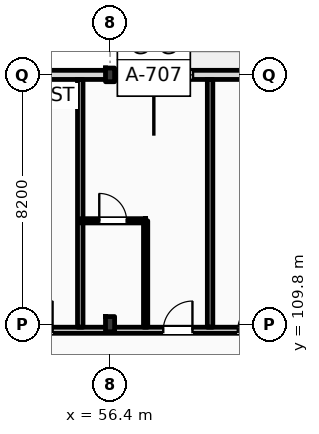
"""IFC4 building model, lengths in metres.
Left out: names, types, materials, properties, quantities, classifications, styles, units other than length and angle.
Written with IfcOpenShell. Run it as: python <this file> out.ifc"""

import sys

from ifc_helpers import new_model, si_unit, direction, frame, frame_2d, origin, origin_2d, place, context, subcontext, project, spatial, rectangle, i_section, extrude, element, fill, save


model = new_model("IFC4")
c1 = context("Model", 3, precision=1e-05, world=origin(), true_north=direction((0.0, 1.0)))
c2 = subcontext(c1, "Body", "Model", "MODEL_VIEW")
j1 = project(units=[si_unit("LENGTHUNIT", "METRE"), si_unit("PLANEANGLEUNIT", "RADIAN")], contexts=[c1])
p1 = place(None, origin())
s1 = spatial("IfcSite", under=j1, at=p1, CompositionType="ELEMENT")
p2 = place(p1, origin())
s2 = spatial("IfcBuilding", under=s1, at=p2, CompositionType="ELEMENT")
p3 = place(p2, frame((0.0, 0.0, 31.8)))
s3 = spatial("IfcBuildingStorey", under=s2, at=p3, CompositionType="ELEMENT", Elevation=31.8)
p4 = place(p3, frame((56.4, 109.8, 0.0), z_axis=(0.0, 0.0, 1.0), x_axis=(1.0, 0.0, 0.0)))
e1 = element("IfcColumn", 1, at=p4, inside=s3, PredefinedType="COLUMN", context=c2, shape_type="SweptSolid", body=[
    extrude(i_section(OverallWidth=0.3, OverallDepth=0.5, WebThickness=0.014, FlangeThickness=0.028, FilletRadius=0.027, at=origin_2d()), origin(), (0.0, 0.0, 1.0), 3.6),
])
p5 = place(p3, frame((56.4, 118.0, 0.0), z_axis=(0.0, 0.0, 1.0), x_axis=(1.0, 0.0, 0.0)))
e2 = element("IfcColumn", 2, at=p5, inside=s3, PredefinedType="COLUMN", context=c2, shape_type="SweptSolid", body=[
    extrude(i_section(OverallWidth=0.3, OverallDepth=0.45, WebThickness=0.014, FlangeThickness=0.026, FilletRadius=0.027, at=origin_2d()), origin(), (0.0, 0.0, 1.0), 3.6),
])
p6 = place(p3, frame((22.5, 118.0, 0.0), z_axis=(0.0, 0.0, 1.0), x_axis=(1.0, 0.0, 0.0)))
e3 = element("IfcWall", 3, at=p6, inside=s3, PredefinedType="STANDARD", context=c2, shape_type="SweptSolid", body=[
    extrude(rectangle(XDim=97.5, YDim=0.3, at=frame_2d((48.75, 0.0))), origin(), (0.0, 0.0, 1.0), 2.72),
])
p7 = place(p6, frame((3.61, 0.0, 0.9)))
e4 = element("IfcOpeningElement", 4, at=p7, cuts=e3, PredefinedType="OPENING", context=c2, shape_type="SweptSolid", body=[
    extrude(rectangle(XDim=1.1, YDim=1.64, at=frame_2d((0.55, 0.82))), frame((0.0, 0.16, 0.0), z_axis=(0.0, -1.0, 0.0), x_axis=(1.0, 0.0, 0.0)), (0.0, 0.0, 1.0), 0.32),
])
p8 = place(p6, frame((6.855, 0.0, 0.0)))
e5 = element("IfcOpeningElement", 5, at=p8, cuts=e3, PredefinedType="OPENING", context=c2, shape_type="SweptSolid", body=[
    extrude(rectangle(XDim=1.2, YDim=2.25, at=frame_2d((0.6, 1.125))), frame((0.0, 0.16, 0.0), z_axis=(0.0, -1.0, 0.0), x_axis=(1.0, 0.0, 0.0)), (0.0, 0.0, 1.0), 0.32),
])
p9 = place(p6, frame((11.405, 0.0, 0.9)))
e6 = element("IfcOpeningElement", 6, at=p9, cuts=e3, PredefinedType="OPENING", context=c2, shape_type="SweptSolid", body=[
    extrude(rectangle(XDim=2.1, YDim=1.64, at=frame_2d((1.05, 0.82))), frame((0.0, 0.16, 0.0), z_axis=(0.0, -1.0, 0.0), x_axis=(1.0, 0.0, 0.0)), (0.0, 0.0, 1.0), 0.32),
])
p10 = place(p6, frame((15.13, 0.0, 0.9)))
e7 = element("IfcOpeningElement", 7, at=p10, cuts=e3, PredefinedType="OPENING", context=c2, shape_type="SweptSolid", body=[
    extrude(rectangle(XDim=2.25, YDim=1.64, at=frame_2d((1.125, 0.82))), frame((0.0, 0.16, 0.0), z_axis=(0.0, -1.0, 0.0), x_axis=(1.0, 0.0, 0.0)), (0.0, 0.0, 1.0), 0.32),
])
p11 = place(p6, frame((21.53, 0.0, 0.0)))
e8 = element("IfcOpeningElement", 8, at=p11, cuts=e3, PredefinedType="OPENING", context=c2, shape_type="SweptSolid", body=[
    extrude(rectangle(XDim=1.2, YDim=2.25, at=frame_2d((0.6, 1.125))), frame((0.0, 0.16, 0.0), z_axis=(0.0, -1.0, 0.0), x_axis=(1.0, 0.0, 0.0)), (0.0, 0.0, 1.0), 0.32),
])
p12 = place(p6, frame((24.18, 0.0, 0.9)))
e9 = element("IfcOpeningElement", 9, at=p12, cuts=e3, PredefinedType="OPENING", context=c2, shape_type="SweptSolid", body=[
    extrude(rectangle(XDim=1.1, YDim=1.64, at=frame_2d((0.55, 0.82))), frame((0.0, 0.16, 0.0), z_axis=(0.0, -1.0, 0.0), x_axis=(1.0, 0.0, 0.0)), (0.0, 0.0, 1.0), 0.32),
])
p13 = place(p6, frame((29.105, 0.0, 0.9)))
e10 = element("IfcOpeningElement", 10, at=p13, cuts=e3, PredefinedType="OPENING", context=c2, shape_type="SweptSolid", body=[
    extrude(rectangle(XDim=2.7, YDim=1.64, at=frame_2d((1.35, 0.82))), frame((0.0, 0.16, 0.0), z_axis=(0.0, -1.0, 0.0), x_axis=(1.0, 0.0, 0.0)), (0.0, 0.0, 1.0), 0.32),
])
p14 = place(p6, frame((34.83, 0.0, 0.9)))
e11 = element("IfcOpeningElement", 11, at=p14, cuts=e3, PredefinedType="OPENING", context=c2, shape_type="SweptSolid", body=[
    extrude(rectangle(XDim=1.8, YDim=1.64, at=frame_2d((0.9, 0.82))), frame((0.0, 0.16, 0.0), z_axis=(0.0, -1.0, 0.0), x_axis=(1.0, 0.0, 0.0)), (0.0, 0.0, 1.0), 0.32),
])
p15 = place(p6, frame((38.525, 0.0, 0.0)))
e12 = element("IfcOpeningElement", 12, at=p15, cuts=e3, PredefinedType="OPENING", context=c2, shape_type="SweptSolid", body=[
    extrude(rectangle(XDim=1.2, YDim=2.25, at=frame_2d((0.6, 1.125))), frame((0.0, 0.16, 0.0), z_axis=(0.0, -1.0, 0.0), x_axis=(1.0, 0.0, 0.0)), (0.0, 0.0, 1.0), 0.32),
])
p16 = place(p6, frame((42.73, 0.0, 0.9)))
e13 = element("IfcOpeningElement", 13, at=p16, cuts=e3, PredefinedType="OPENING", context=c2, shape_type="SweptSolid", body=[
    extrude(rectangle(XDim=3.05, YDim=1.64, at=frame_2d((1.525, 0.82))), frame((0.0, 0.16, 0.0), z_axis=(0.0, -1.0, 0.0), x_axis=(1.0, 0.0, 0.0)), (0.0, 0.0, 1.0), 0.32),
])
p17 = place(p6, frame((47.155, 0.0, 0.9)))
e14 = element("IfcOpeningElement", 14, at=p17, cuts=e3, PredefinedType="OPENING", context=c2, shape_type="SweptSolid", body=[
    extrude(rectangle(XDim=1.35, YDim=1.64, at=frame_2d((0.675, 0.82))), frame((0.0, 0.16, 0.0), z_axis=(0.0, -1.0, 0.0), x_axis=(1.0, 0.0, 0.0)), (0.0, 0.0, 1.0), 0.32),
])
p18 = place(p6, frame((53.065, 0.0, 0.0)))
e15 = element("IfcOpeningElement", 15, at=p18, cuts=e3, PredefinedType="OPENING", context=c2, shape_type="SweptSolid", body=[
    extrude(rectangle(XDim=1.2, YDim=2.25, at=frame_2d((0.6, 1.125))), frame((0.0, 0.16, 0.0), z_axis=(0.0, -1.0, 0.0), x_axis=(1.0, 0.0, 0.0)), (0.0, 0.0, 1.0), 0.32),
])
p19 = place(p6, frame((58.2, 0.0, 0.9)))
e16 = element("IfcOpeningElement", 16, at=p19, cuts=e3, PredefinedType="OPENING", context=c2, shape_type="SweptSolid", body=[
    extrude(rectangle(XDim=1.8, YDim=1.64, at=frame_2d((0.9, 0.82))), frame((0.0, 0.16, 0.0), z_axis=(0.0, -1.0, 0.0), x_axis=(1.0, 0.0, 0.0)), (0.0, 0.0, 1.0), 0.32),
])
p20 = place(p6, frame((61.13, 0.0, 0.9)))
e17 = element("IfcOpeningElement", 17, at=p20, cuts=e3, PredefinedType="OPENING", context=c2, shape_type="SweptSolid", body=[
    extrude(rectangle(XDim=3.05, YDim=1.64, at=frame_2d((1.525, 0.82))), frame((0.0, 0.16, 0.0), z_axis=(0.0, -1.0, 0.0), x_axis=(1.0, 0.0, 0.0)), (0.0, 0.0, 1.0), 0.32),
])
p21 = place(p6, frame((67.93, 0.0, 0.0)))
e18 = element("IfcOpeningElement", 18, at=p21, cuts=e3, PredefinedType="OPENING", context=c2, shape_type="SweptSolid", body=[
    extrude(rectangle(XDim=1.2, YDim=2.25, at=frame_2d((0.6, 1.125))), frame((0.0, 0.16, 0.0), z_axis=(0.0, -1.0, 0.0), x_axis=(1.0, 0.0, 0.0)), (0.0, 0.0, 1.0), 0.32),
])
p22 = place(p6, frame((70.39, 0.0, 0.0)))
e19 = element("IfcOpeningElement", 19, at=p22, cuts=e3, PredefinedType="OPENING", context=c2, shape_type="SweptSolid", body=[
    extrude(rectangle(XDim=1.2, YDim=2.25, at=frame_2d((0.6, 1.125))), frame((0.0, 0.16, 0.0), z_axis=(0.0, -1.0, 0.0), x_axis=(1.0, 0.0, 0.0)), (0.0, 0.0, 1.0), 0.32),
])
p23 = place(p6, frame((75.905, 0.0, 0.9)))
e20 = element("IfcOpeningElement", 20, at=p23, cuts=e3, PredefinedType="OPENING", context=c2, shape_type="SweptSolid", body=[
    extrude(rectangle(XDim=1.1, YDim=1.5, at=frame_2d((0.55, 0.75))), frame((0.0, 0.16, 0.0), z_axis=(0.0, -1.0, 0.0), x_axis=(1.0, 0.0, 0.0)), (0.0, 0.0, 1.0), 0.32),
])
p24 = place(p6, frame((81.63, 0.0, 0.9)))
e21 = element("IfcOpeningElement", 21, at=p24, cuts=e3, PredefinedType="OPENING", context=c2, shape_type="SweptSolid", body=[
    extrude(rectangle(XDim=1.1, YDim=1.6, at=frame_2d((0.55, 0.8))), frame((0.0, 0.16, 0.0), z_axis=(0.0, -1.0, 0.0), x_axis=(1.0, 0.0, 0.0)), (0.0, 0.0, 1.0), 0.32),
])
p25 = place(p6, frame((84.955, 0.0, 0.9)))
e22 = element("IfcOpeningElement", 22, at=p25, cuts=e3, PredefinedType="OPENING", context=c2, shape_type="SweptSolid", body=[
    extrude(rectangle(XDim=1.4, YDim=1.64, at=frame_2d((0.7, 0.82))), frame((0.0, 0.16, 0.0), z_axis=(0.0, -1.0, 0.0), x_axis=(1.0, 0.0, 0.0)), (0.0, 0.0, 1.0), 0.32),
])
p26 = place(p6, frame((90.055, 0.0, 0.9)))
e23 = element("IfcOpeningElement", 23, at=p26, cuts=e3, PredefinedType="OPENING", context=c2, shape_type="SweptSolid", body=[
    extrude(rectangle(XDim=1.6, YDim=1.64, at=frame_2d((0.8, 0.82))), frame((0.0, 0.16, 0.0), z_axis=(0.0, -1.0, 0.0), x_axis=(1.0, 0.0, 0.0)), (0.0, 0.0, 1.0), 0.32),
])
p27 = place(p6, frame((93.87, 0.0, 0.9)))
e24 = element("IfcOpeningElement", 24, at=p27, cuts=e3, PredefinedType="OPENING", context=c2, shape_type="SweptSolid", body=[
    extrude(rectangle(XDim=1.75, YDim=1.64, at=frame_2d((0.875, 0.82))), frame((0.0, 0.16, 0.0), z_axis=(0.0, -1.0, 0.0), x_axis=(1.0, 0.0, 0.0)), (0.0, 0.0, 1.0), 0.32),
])
p28 = place(p3, frame((10.65, 109.6, 0.0), z_axis=(0.0, 0.0, 1.0), x_axis=(1.0, 0.0, 0.0)))
e25 = element("IfcWall", 25, at=p28, inside=s3, PredefinedType="PARTITIONING", context=c2, shape_type="SweptSolid", body=[
    extrude(rectangle(XDim=109.21, YDim=0.2, at=frame_2d((54.605, 0.0))), origin(), (0.0, 0.0, 1.0), 2.72),
])
p29 = place(p28, frame((15.825, 0.0, 0.0)))
e26 = element("IfcOpeningElement", 26, at=p29, cuts=e25, PredefinedType="OPENING", context=c2, shape_type="SweptSolid", body=[
    extrude(rectangle(XDim=1.02, YDim=2.2, at=frame_2d((0.51, 1.1))), frame((0.0, 0.11, 0.0), z_axis=(0.0, -1.0, 0.0), x_axis=(1.0, 0.0, 0.0)), (0.0, 0.0, 1.0), 0.22),
])
p30 = place(p28, frame((19.87, 0.0, 0.0)))
e27 = element("IfcOpeningElement", 27, at=p30, cuts=e25, PredefinedType="OPENING", context=c2, shape_type="SweptSolid", body=[
    extrude(rectangle(XDim=1.02, YDim=2.2, at=frame_2d((0.51, 1.1))), frame((0.0, 0.11, 0.0), z_axis=(0.0, -1.0, 0.0), x_axis=(1.0, 0.0, 0.0)), (0.0, 0.0, 1.0), 0.22),
])
p31 = place(p28, frame((24.47, 0.0, 0.0)))
e28 = element("IfcOpeningElement", 28, at=p31, cuts=e25, PredefinedType="OPENING", context=c2, shape_type="SweptSolid", body=[
    extrude(rectangle(XDim=1.02, YDim=2.2, at=frame_2d((0.51, 1.1))), frame((0.0, 0.11, 0.0), z_axis=(0.0, -1.0, 0.0), x_axis=(1.0, 0.0, 0.0)), (0.0, 0.0, 1.0), 0.22),
])
p32 = place(p28, frame((26.92, 0.0, 0.0)))
e29 = element("IfcOpeningElement", 29, at=p32, cuts=e25, PredefinedType="OPENING", context=c2, shape_type="SweptSolid", body=[
    extrude(rectangle(XDim=1.02, YDim=2.2, at=frame_2d((0.51, 1.1))), frame((0.0, 0.11, 0.0), z_axis=(0.0, -1.0, 0.0), x_axis=(1.0, 0.0, 0.0)), (0.0, 0.0, 1.0), 0.22),
])
p33 = place(p28, frame((33.7, 0.0, 0.0)))
e30 = element("IfcOpeningElement", 30, at=p33, cuts=e25, PredefinedType="OPENING", context=c2, shape_type="SweptSolid", body=[
    extrude(rectangle(XDim=0.96, YDim=2.2, at=frame_2d((0.48, 1.1))), frame((0.0, 0.11, 0.0), z_axis=(0.0, -1.0, 0.0), x_axis=(1.0, 0.0, 0.0)), (0.0, 0.0, 1.0), 0.22),
])
p34 = place(p28, frame((35.9, 0.0, 0.0)))
e31 = element("IfcOpeningElement", 31, at=p34, cuts=e25, PredefinedType="OPENING", context=c2, shape_type="SweptSolid", body=[
    extrude(rectangle(XDim=0.96, YDim=2.2, at=frame_2d((0.48, 1.1))), frame((0.0, 0.11, 0.0), z_axis=(0.0, -1.0, 0.0), x_axis=(1.0, 0.0, 0.0)), (0.0, 0.0, 1.0), 0.22),
])
p35 = place(p28, frame((42.9, 0.0, 0.0)))
e32 = element("IfcOpeningElement", 32, at=p35, cuts=e25, PredefinedType="OPENING", context=c2, shape_type="SweptSolid", body=[
    extrude(rectangle(XDim=0.96, YDim=2.2, at=frame_2d((0.48, 1.1))), frame((0.0, 0.11, 0.0), z_axis=(0.0, -1.0, 0.0), x_axis=(1.0, 0.0, 0.0)), (0.0, 0.0, 1.0), 0.22),
])
p36 = place(p28, frame((47.5, 0.0, 0.0)))
e33 = element("IfcOpeningElement", 33, at=p36, cuts=e25, PredefinedType="OPENING", context=c2, shape_type="SweptSolid", body=[
    extrude(rectangle(XDim=0.96, YDim=2.2, at=frame_2d((0.48, 1.1))), frame((0.0, 0.11, 0.0), z_axis=(0.0, -1.0, 0.0), x_axis=(1.0, 0.0, 0.0)), (0.0, 0.0, 1.0), 0.22),
])
p37 = place(p28, frame((49.95, 0.0, 0.0)))
e34 = element("IfcOpeningElement", 34, at=p37, cuts=e25, PredefinedType="OPENING", context=c2, shape_type="SweptSolid", body=[
    extrude(rectangle(XDim=0.96, YDim=2.2, at=frame_2d((0.48, 1.1))), frame((0.0, 0.11, 0.0), z_axis=(0.0, -1.0, 0.0), x_axis=(1.0, 0.0, 0.0)), (0.0, 0.0, 1.0), 0.22),
])
p38 = place(p28, frame((56.7, 0.0, 0.0)))
e35 = element("IfcOpeningElement", 35, at=p38, cuts=e25, PredefinedType="OPENING", context=c2, shape_type="SweptSolid", body=[
    extrude(rectangle(XDim=0.96, YDim=2.2, at=frame_2d((0.48, 1.1))), frame((0.0, 0.11, 0.0), z_axis=(0.0, -1.0, 0.0), x_axis=(1.0, 0.0, 0.0)), (0.0, 0.0, 1.0), 0.22),
])
p39 = place(p28, frame((59.15, 0.0, 0.0)))
e36 = element("IfcOpeningElement", 36, at=p39, cuts=e25, PredefinedType="OPENING", context=c2, shape_type="SweptSolid", body=[
    extrude(rectangle(XDim=0.96, YDim=2.2, at=frame_2d((0.48, 1.1))), frame((0.0, 0.11, 0.0), z_axis=(0.0, -1.0, 0.0), x_axis=(1.0, 0.0, 0.0)), (0.0, 0.0, 1.0), 0.22),
])
p40 = place(p28, frame((65.9, 0.0, 0.0)))
e37 = element("IfcOpeningElement", 37, at=p40, cuts=e25, PredefinedType="OPENING", context=c2, shape_type="SweptSolid", body=[
    extrude(rectangle(XDim=0.96, YDim=2.2, at=frame_2d((0.48, 1.1))), frame((0.0, 0.11, 0.0), z_axis=(0.0, -1.0, 0.0), x_axis=(1.0, 0.0, 0.0)), (0.0, 0.0, 1.0), 0.22),
])
p41 = place(p28, frame((70.5, 0.0, 0.0)))
e38 = element("IfcOpeningElement", 38, at=p41, cuts=e25, PredefinedType="OPENING", context=c2, shape_type="SweptSolid", body=[
    extrude(rectangle(XDim=0.96, YDim=2.2, at=frame_2d((0.48, 1.1))), frame((0.0, 0.11, 0.0), z_axis=(0.0, -1.0, 0.0), x_axis=(1.0, 0.0, 0.0)), (0.0, 0.0, 1.0), 0.22),
])
p42 = place(p28, frame((72.95, 0.0, 0.0)))
e39 = element("IfcOpeningElement", 39, at=p42, cuts=e25, PredefinedType="OPENING", context=c2, shape_type="SweptSolid", body=[
    extrude(rectangle(XDim=0.96, YDim=2.2, at=frame_2d((0.48, 1.1))), frame((0.0, 0.11, 0.0), z_axis=(0.0, -1.0, 0.0), x_axis=(1.0, 0.0, 0.0)), (0.0, 0.0, 1.0), 0.22),
])
p43 = place(p28, frame((79.7, 0.0, 0.0)))
e40 = element("IfcOpeningElement", 40, at=p43, cuts=e25, PredefinedType="OPENING", context=c2, shape_type="SweptSolid", body=[
    extrude(rectangle(XDim=0.96, YDim=2.2, at=frame_2d((0.48, 1.1))), frame((0.0, 0.11, 0.0), z_axis=(0.0, -1.0, 0.0), x_axis=(1.0, 0.0, 0.0)), (0.0, 0.0, 1.0), 0.22),
])
p44 = place(p28, frame((82.15, 0.0, 0.0)))
e41 = element("IfcOpeningElement", 41, at=p44, cuts=e25, PredefinedType="OPENING", context=c2, shape_type="SweptSolid", body=[
    extrude(rectangle(XDim=0.96, YDim=2.2, at=frame_2d((0.48, 1.1))), frame((0.0, 0.11, 0.0), z_axis=(0.0, -1.0, 0.0), x_axis=(1.0, 0.0, 0.0)), (0.0, 0.0, 1.0), 0.22),
])
p45 = place(p28, frame((88.9, 0.0, 0.0)))
e42 = element("IfcOpeningElement", 42, at=p45, cuts=e25, PredefinedType="OPENING", context=c2, shape_type="SweptSolid", body=[
    extrude(rectangle(XDim=0.96, YDim=2.2, at=frame_2d((0.48, 1.1))), frame((0.0, 0.11, 0.0), z_axis=(0.0, -1.0, 0.0), x_axis=(1.0, 0.0, 0.0)), (0.0, 0.0, 1.0), 0.22),
])
p46 = place(p28, frame((93.75, 0.0, 0.0)))
e43 = element("IfcOpeningElement", 43, at=p46, cuts=e25, PredefinedType="OPENING", context=c2, shape_type="SweptSolid", body=[
    extrude(rectangle(XDim=0.96, YDim=2.2, at=frame_2d((0.48, 1.1))), frame((0.0, 0.11, 0.0), z_axis=(0.0, -1.0, 0.0), x_axis=(1.0, 0.0, 0.0)), (0.0, 0.0, 1.0), 0.22),
])
p47 = place(p28, frame((98.1, 0.0, 0.0)))
e44 = element("IfcOpeningElement", 44, at=p47, cuts=e25, PredefinedType="OPENING", context=c2, shape_type="SweptSolid", body=[
    extrude(rectangle(XDim=0.96, YDim=2.2, at=frame_2d((0.48, 1.1))), frame((0.0, 0.11, 0.0), z_axis=(0.0, -1.0, 0.0), x_axis=(1.0, 0.0, 0.0)), (0.0, 0.0, 1.0), 0.22),
])
p48 = place(p28, frame((102.7, 0.0, 0.0)))
e45 = element("IfcOpeningElement", 45, at=p48, cuts=e25, PredefinedType="OPENING", context=c2, shape_type="SweptSolid", body=[
    extrude(rectangle(XDim=0.96, YDim=2.2, at=frame_2d((0.48, 1.1))), frame((0.0, 0.11, 0.0), z_axis=(0.0, -1.0, 0.0), x_axis=(1.0, 0.0, 0.0)), (0.0, 0.0, 1.0), 0.22),
])
p49 = place(p28, frame((105.04, 0.0, 0.0)))
e46 = element("IfcOpeningElement", 46, at=p49, cuts=e25, PredefinedType="OPENING", context=c2, shape_type="SweptSolid", body=[
    extrude(rectangle(XDim=0.96, YDim=2.2, at=frame_2d((0.48, 1.1))), frame((0.0, 0.11, 0.0), z_axis=(0.0, -1.0, 0.0), x_axis=(1.0, 0.0, 0.0)), (0.0, 0.0, 1.0), 0.22),
])
p50 = place(p28, frame((2.716, 0.0, 0.0)))
e47 = element("IfcOpeningElement", 47, at=p50, cuts=e25, PredefinedType="OPENING", context=c2, shape_type="SweptSolid", body=[
    extrude(rectangle(XDim=1.35, YDim=2.25, at=frame_2d((0.675, 1.125))), frame((0.0, 0.11, 0.0), z_axis=(0.0, -1.0, 0.0), x_axis=(1.0, 0.0, 0.0)), (0.0, 0.0, 1.0), 0.22),
])
p51 = place(p28, frame((6.65, 0.0, 0.0)))
e48 = element("IfcOpeningElement", 48, at=p51, cuts=e25, PredefinedType="OPENING", context=c2, shape_type="SweptSolid", body=[
    extrude(rectangle(XDim=1.35, YDim=2.25, at=frame_2d((0.675, 1.125))), frame((0.0, 0.11, 0.0), z_axis=(0.0, -1.0, 0.0), x_axis=(1.0, 0.0, 0.0)), (0.0, 0.0, 1.0), 0.22),
])
p52 = place(p28, frame((10.583, 0.0, 0.0)))
e49 = element("IfcOpeningElement", 49, at=p52, cuts=e25, PredefinedType="OPENING", context=c2, shape_type="SweptSolid", body=[
    extrude(rectangle(XDim=1.35, YDim=2.25, at=frame_2d((0.675, 1.125))), frame((0.0, 0.11, 0.0), z_axis=(0.0, -1.0, 0.0), x_axis=(1.0, 0.0, 0.0)), (0.0, 0.0, 1.0), 0.22),
])
for number, where, z_axis, x_axis in (
    (50, (55.42, 109.7, 0.0), (0.0, 0.0, 1.0), (0.0, 1.0, 0.0)),
    (51, (59.69, 109.7, 0.0), (0.0, 0.0, 1.0), (0.0, 1.0, 0.0)),
):
    element("IfcWall", number, at=place(p3, frame(where, z_axis=z_axis, x_axis=x_axis)), inside=s3, PredefinedType="PARTITIONING", context=c2, shape_type="SweptSolid", body=[
        extrude(rectangle(XDim=8.15, YDim=0.18, at=frame_2d((4.075, 0.0))), origin(), (0.0, 0.0, 1.0), 3.36),
    ])
p53 = place(p3, frame((57.57, 109.7, 0.0), z_axis=(0.0, 0.0, 1.0), x_axis=(0.0, 1.0, 0.0)))
e52 = element("IfcWall", 52, at=p53, inside=s3, PredefinedType="PARTITIONING", context=c2, shape_type="SweptSolid", body=[
    extrude(rectangle(XDim=3.5, YDim=0.14, at=frame_2d((1.75, 0.0))), origin(), (0.0, 0.0, 1.0), 3.36),
])
p54 = place(p3, frame((55.42, 113.2, 0.0), z_axis=(0.0, 0.0, 1.0), x_axis=(1.0, 0.0, 0.0)))
e53 = element("IfcWall", 53, at=p54, inside=s3, PredefinedType="PARTITIONING", context=c2, shape_type="SweptSolid", body=[
    extrude(rectangle(XDim=2.15, YDim=0.14, at=frame_2d((1.075, 0.0))), origin(), (0.0, 0.0, 1.0), 3.36),
])
p55 = place(p54, frame((0.625, 0.0, 0.0)))
e54 = element("IfcOpeningElement", 54, at=p55, cuts=e53, PredefinedType="OPENING", context=c2, shape_type="SweptSolid", body=[
    extrude(rectangle(XDim=0.9, YDim=2.1, at=frame_2d((0.45, 1.05))), frame((0.0, 0.08, 0.0), z_axis=(0.0, -1.0, 0.0), x_axis=(1.0, 0.0, 0.0)), (0.0, 0.0, 1.0), 0.16),
])
p56 = place(p14, origin())
e55 = element("IfcWindow", 55, at=p56, inside=s3, PartitioningType="DOUBLE_PANEL_VERTICAL", PredefinedType="WINDOW", context=c2, shape_type="SweptSolid", body=[
    extrude(rectangle(XDim=1.8, YDim=1.64, at=frame_2d((0.9, 0.82))), frame((0.0, 0.03, 0.0), z_axis=(0.0, -1.0, 0.0), x_axis=(1.0, 0.0, 0.0)), (0.0, 0.0, 1.0), 0.06),
])
fill(e11, e55)
p57 = place(p35, origin())
e56 = element("IfcDoor", 56, at=p57, inside=s3, OperationType="SINGLE_SWING_RIGHT", PredefinedType="DOOR", context=c2, shape_type="SweptSolid", body=[
    extrude(rectangle(XDim=0.96, YDim=2.2, at=frame_2d((0.48, 1.1))), frame((0.0, 0.025, 0.0), z_axis=(0.0, -1.0, 0.0), x_axis=(1.0, 0.0, 0.0)), (0.0, 0.0, 1.0), 0.05),
])
fill(e32, e56)
p58 = place(p36, origin())
e57 = element("IfcDoor", 57, at=p58, inside=s3, OperationType="SINGLE_SWING_RIGHT", PredefinedType="DOOR", context=c2, shape_type="SweptSolid", body=[
    extrude(rectangle(XDim=0.96, YDim=2.2, at=frame_2d((0.48, 1.1))), frame((0.0, 0.025, 0.0), z_axis=(0.0, -1.0, 0.0), x_axis=(1.0, 0.0, 0.0)), (0.0, 0.0, 1.0), 0.05),
])
fill(e33, e57)
p59 = place(p55, origin())
e58 = element("IfcDoor", 58, at=p59, inside=s3, OperationType="SINGLE_SWING_LEFT", PredefinedType="DOOR", context=c2, shape_type="SweptSolid", body=[
    extrude(rectangle(XDim=0.9, YDim=2.1, at=frame_2d((0.45, 1.05))), frame((0.0, 0.025, 0.0), z_axis=(0.0, -1.0, 0.0), x_axis=(1.0, 0.0, 0.0)), (0.0, 0.0, 1.0), 0.05),
])
fill(e54, e58)
p60 = place(p37, origin())
e59 = element("IfcDoor", 59, at=p60, inside=s3, OperationType="SINGLE_SWING_RIGHT", PredefinedType="DOOR", context=c2, shape_type="SweptSolid", body=[
    extrude(rectangle(XDim=0.96, YDim=2.2, at=frame_2d((0.48, 1.1))), frame((0.0, 0.025, 0.0), z_axis=(0.0, -1.0, 0.0), x_axis=(1.0, 0.0, 0.0)), (0.0, 0.0, 1.0), 0.05),
])
fill(e34, e59)
save(model, sys.argv[1])
